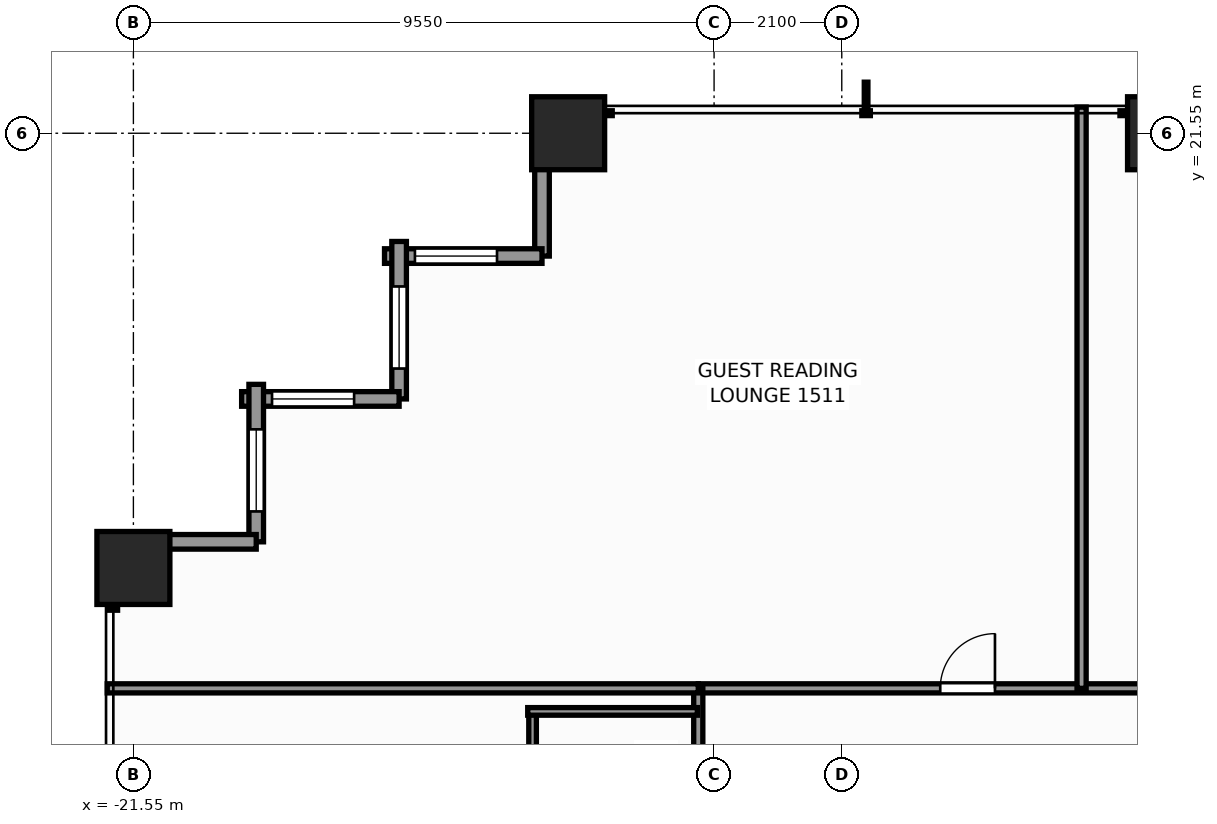
"""IFC4 building model, lengths in metres.
Left out: names, types, materials, properties, quantities, classifications, styles, units other than length and angle.
Written with IfcOpenShell. Run it as: python <this file> out.ifc"""

import sys

from ifc_helpers import new_model, si_unit, direction, frame, frame_2d, origin, origin_2d, place, context, subcontext, project, spatial, rectangle, extrude, element, fill, save


model = new_model("IFC4")
c1 = context("Model", 3, precision=1e-05, world=origin(), true_north=direction((0.0, 1.0)))
c2 = subcontext(c1, "Body", "Model", "MODEL_VIEW")
j1 = project(units=[si_unit("LENGTHUNIT", "METRE"), si_unit("PLANEANGLEUNIT", "RADIAN")], contexts=[c1])
p1 = place(None, origin())
s1 = spatial("IfcSite", under=j1, at=p1, CompositionType="ELEMENT")
p2 = place(p1, origin())
s2 = spatial("IfcBuilding", under=s1, at=p2, CompositionType="ELEMENT")
p3 = place(p2, frame((0.0, 0.0, 53.5)))
s3 = spatial("IfcBuildingStorey", under=s2, at=p3, CompositionType="ELEMENT", Elevation=53.5)
for number, where, z_axis, x_axis in (
    (1, (-14.4, 21.55, 0.0), (0.0, 0.0, 1.0), (1.0, 0.0, 0.0)),
    (2, (-4.6, 21.55, 0.0), (0.0, 0.0, 1.0), (1.0, 0.0, 0.0)),
    (3, (-21.55, 14.4, 0.0), (0.0, 0.0, 1.0), (1.0, 0.0, 0.0)),
):
    element("IfcColumn", number, at=place(p3, frame(where, z_axis=z_axis, x_axis=x_axis)), inside=s3, PredefinedType="COLUMN", context=c2, shape_type="SweptSolid", body=[
        extrude(rectangle(XDim=1.2, YDim=1.2, at=origin_2d()), origin(), (0.0, 0.0, 1.0), 3.3),
    ])
p4 = place(p3, frame((-14.83, 19.53, 0.0), z_axis=(0.0, 0.0, 1.0), x_axis=(0.0, 1.0, 0.0)))
e4 = element("IfcWall", 4, at=p4, inside=s3, PredefinedType="STANDARD", context=c2, shape_type="SweptSolid", body=[
    extrude(rectangle(XDim=2.59, YDim=0.24, at=frame_2d((1.295, 0.0))), origin(), (0.0, 0.0, 1.0), 2.439),
])
p5 = place(p3, frame((-17.42, 19.53, 0.0), z_axis=(0.0, 0.0, 1.0), x_axis=(1.0, 0.0, 0.0)))
e5 = element("IfcWall", 5, at=p5, inside=s3, PredefinedType="STANDARD", context=c2, shape_type="SweptSolid", body=[
    extrude(rectangle(XDim=2.59, YDim=0.24, at=frame_2d((1.295, 0.0))), origin(), (0.0, 0.0, 1.0), 2.439),
])
p6 = place(p5, frame((0.5, 0.0, 0.65)))
e6 = element("IfcOpeningElement", 6, at=p6, cuts=e5, PredefinedType="OPENING", context=c2, shape_type="SweptSolid", body=[
    extrude(rectangle(XDim=1.35, YDim=1.55, at=frame_2d((0.675, 0.775))), frame((0.0, 0.13, 0.0), z_axis=(0.0, -1.0, 0.0), x_axis=(1.0, 0.0, 0.0)), (0.0, 0.0, 1.0), 0.26),
])
p7 = place(p3, frame((-17.18, 17.18, 0.0), z_axis=(0.0, 0.0, 1.0), x_axis=(0.0, 1.0, 0.0)))
e7 = element("IfcWall", 7, at=p7, inside=s3, PredefinedType="STANDARD", context=c2, shape_type="SweptSolid", body=[
    extrude(rectangle(XDim=2.59, YDim=0.24, at=frame_2d((1.295, 0.0))), origin(), (0.0, 0.0, 1.0), 2.439),
])
p8 = place(p7, frame((0.5, 0.0, 0.65)))
e8 = element("IfcOpeningElement", 8, at=p8, cuts=e7, PredefinedType="OPENING", context=c2, shape_type="SweptSolid", body=[
    extrude(rectangle(XDim=1.35, YDim=1.55, at=frame_2d((0.675, 0.775))), frame((0.0, 0.13, 0.0), z_axis=(0.0, -1.0, 0.0), x_axis=(1.0, 0.0, 0.0)), (0.0, 0.0, 1.0), 0.26),
])
p9 = place(p3, frame((-19.77, 17.18, 0.0), z_axis=(0.0, 0.0, 1.0), x_axis=(1.0, 0.0, 0.0)))
e9 = element("IfcWall", 9, at=p9, inside=s3, PredefinedType="STANDARD", context=c2, shape_type="SweptSolid", body=[
    extrude(rectangle(XDim=2.59, YDim=0.24, at=frame_2d((1.295, 0.0))), origin(), (0.0, 0.0, 1.0), 2.439),
])
p10 = place(p9, frame((0.5, 0.0, 0.65)))
e10 = element("IfcOpeningElement", 10, at=p10, cuts=e9, PredefinedType="OPENING", context=c2, shape_type="SweptSolid", body=[
    extrude(rectangle(XDim=1.35, YDim=1.55, at=frame_2d((0.675, 0.775))), frame((0.0, 0.13, 0.0), z_axis=(0.0, -1.0, 0.0), x_axis=(1.0, 0.0, 0.0)), (0.0, 0.0, 1.0), 0.26),
])
p11 = place(p3, frame((-19.53, 14.83, 0.0), z_axis=(0.0, 0.0, 1.0), x_axis=(0.0, 1.0, 0.0)))
e11 = element("IfcWall", 11, at=p11, inside=s3, PredefinedType="STANDARD", context=c2, shape_type="SweptSolid", body=[
    extrude(rectangle(XDim=2.59, YDim=0.24, at=frame_2d((1.295, 0.0))), origin(), (0.0, 0.0, 1.0), 2.439),
])
p12 = place(p11, frame((0.5, 0.0, 0.65)))
e12 = element("IfcOpeningElement", 12, at=p12, cuts=e11, PredefinedType="OPENING", context=c2, shape_type="SweptSolid", body=[
    extrude(rectangle(XDim=1.35, YDim=1.55, at=frame_2d((0.675, 0.775))), frame((0.0, 0.13, 0.0), z_axis=(0.0, -1.0, 0.0), x_axis=(1.0, 0.0, 0.0)), (0.0, 0.0, 1.0), 0.26),
])
p13 = place(p3, frame((-22.12, 14.83, 0.0), z_axis=(0.0, 0.0, 1.0), x_axis=(1.0, 0.0, 0.0)))
e13 = element("IfcWall", 13, at=p13, inside=s3, PredefinedType="STANDARD", context=c2, shape_type="SweptSolid", body=[
    extrude(rectangle(XDim=2.59, YDim=0.24, at=frame_2d((1.295, 0.0))), origin(), (0.0, 0.0, 1.0), 2.439),
])
p14 = place(p3, frame((-12.26, 12.42, 0.0), z_axis=(0.0, 0.0, 1.0), x_axis=(1.0, 0.0, 0.0)))
e14 = element("IfcWall", 14, at=p14, inside=s3, PredefinedType="PARTITIONING", context=c2, shape_type="SweptSolid", body=[
    extrude(rectangle(XDim=24.84, YDim=0.15, at=frame_2d((12.42, 0.0))), origin(), (0.0, 0.0, 1.0), 2.272),
])
p15 = place(p14, frame((3.979, 0.0, 0.0)))
e15 = element("IfcOpeningElement", 15, at=p15, cuts=e14, PredefinedType="OPENING", context=c2, shape_type="SweptSolid", body=[
    extrude(rectangle(XDim=0.9, YDim=2.06, at=frame_2d((0.45, 1.03))), frame((0.0, 0.085, 0.0), z_axis=(0.0, -1.0, 0.0), x_axis=(1.0, 0.0, 0.0)), (0.0, 0.0, 1.0), 0.17),
])
p16 = place(p14, frame((9.78, 0.0, 0.0)))
e16 = element("IfcOpeningElement", 16, at=p16, cuts=e14, PredefinedType="OPENING", context=c2, shape_type="SweptSolid", body=[
    extrude(rectangle(XDim=0.9, YDim=2.06, at=frame_2d((0.45, 1.03))), frame((0.0, 0.085, 0.0), z_axis=(0.0, -1.0, 0.0), x_axis=(1.0, 0.0, 0.0)), (0.0, 0.0, 1.0), 0.17),
])
p17 = place(p14, frame((19.345, 0.0, 0.0)))
e17 = element("IfcOpeningElement", 17, at=p17, cuts=e14, PredefinedType="OPENING", context=c2, shape_type="SweptSolid", body=[
    extrude(rectangle(XDim=0.9, YDim=2.06, at=frame_2d((0.45, 1.03))), frame((0.0, 0.085, 0.0), z_axis=(0.0, -1.0, 0.0), x_axis=(1.0, 0.0, 0.0)), (0.0, 0.0, 1.0), 0.17),
])
p18 = place(p3, frame((-12.26, -12.42, 0.0), z_axis=(0.0, 0.0, 1.0), x_axis=(0.0, 1.0, 0.0)))
e18 = element("IfcWall", 18, at=p18, inside=s3, PredefinedType="PARTITIONING", context=c2, shape_type="SweptSolid", body=[
    extrude(rectangle(XDim=24.84, YDim=0.15, at=frame_2d((12.42, 0.0))), origin(), (0.0, 0.0, 1.0), 2.272),
])
p19 = place(p18, frame((3.551, 0.0, 0.0)))
e19 = element("IfcOpeningElement", 19, at=p19, cuts=e18, PredefinedType="OPENING", context=c2, shape_type="SweptSolid", body=[
    extrude(rectangle(XDim=0.95, YDim=2.06, at=frame_2d((0.475, 1.03))), frame((0.0, 0.085, 0.0), z_axis=(0.0, -1.0, 0.0), x_axis=(1.0, 0.0, 0.0)), (0.0, 0.0, 1.0), 0.17),
])
p20 = place(p18, frame((9.94, 0.0, 0.0)))
e20 = element("IfcOpeningElement", 20, at=p20, cuts=e18, PredefinedType="OPENING", context=c2, shape_type="SweptSolid", body=[
    extrude(rectangle(XDim=0.9, YDim=2.06, at=frame_2d((0.45, 1.03))), frame((0.0, 0.085, 0.0), z_axis=(0.0, -1.0, 0.0), x_axis=(1.0, 0.0, 0.0)), (0.0, 0.0, 1.0), 0.17),
])
p21 = place(p18, frame((19.741, 0.0, 0.0)))
e21 = element("IfcOpeningElement", 21, at=p21, cuts=e18, PredefinedType="OPENING", context=c2, shape_type="SweptSolid", body=[
    extrude(rectangle(XDim=0.95, YDim=2.06, at=frame_2d((0.475, 1.03))), frame((0.0, 0.085, 0.0), z_axis=(0.0, -1.0, 0.0), x_axis=(1.0, 0.0, 0.0)), (0.0, 0.0, 1.0), 0.17),
])
p22 = place(p3, frame((-21.98, 12.42, 0.0), z_axis=(0.0, 0.0, 1.0), x_axis=(1.0, 0.0, 0.0)))
e22 = element("IfcWall", 22, at=p22, inside=s3, PredefinedType="PARTITIONING", context=c2, shape_type="SweptSolid", body=[
    extrude(rectangle(XDim=9.72, YDim=0.15, at=frame_2d((4.86, 0.0))), origin(), (0.0, 0.0, 1.0), 2.272),
])
p23 = place(p3, frame((-14.985, 9.731, 0.0), z_axis=(0.0, 0.0, 1.0), x_axis=(0.0, 1.0, 0.0)))
e23 = element("IfcWall", 23, at=p23, inside=s3, PredefinedType="PARTITIONING", context=c2, shape_type="SweptSolid", body=[
    extrude(rectangle(XDim=2.37, YDim=0.125, at=frame_2d((1.185, 0.0))), origin(), (0.0, 0.0, 1.0), 2.272),
])
p24 = place(p3, frame((-15.065, 12.041, 0.0), z_axis=(0.0, 0.0, 1.0), x_axis=(1.0, 0.0, 0.0)))
e24 = element("IfcWall", 24, at=p24, inside=s3, PredefinedType="PARTITIONING", context=c2, shape_type="SweptSolid", body=[
    extrude(rectangle(XDim=2.79, YDim=0.125, at=frame_2d((1.395, 0.0))), origin(), (0.0, 0.0, 1.0), 2.272),
])
p25 = place(p3, frame((-5.956, 12.42, 0.0), z_axis=(0.0, 0.0, 1.0), x_axis=(0.0, 1.0, 0.0)))
e25 = element("IfcWall", 25, at=p25, inside=s3, PredefinedType="PARTITIONING", context=c2, shape_type="SweptSolid", body=[
    extrude(rectangle(XDim=9.56, YDim=0.15, at=frame_2d((4.78, 0.0))), origin(), (0.0, 0.0, 1.0), 2.429),
])
p26 = place(p6, origin())
e26 = element("IfcWindow", 26, at=p26, inside=s3, PartitioningType="SINGLE_PANEL", PredefinedType="WINDOW", context=c2, shape_type="SweptSolid", body=[
    extrude(rectangle(XDim=1.35, YDim=1.55, at=frame_2d((0.675, 0.775))), frame((0.0, 0.03, 0.0), z_axis=(0.0, -1.0, 0.0), x_axis=(1.0, 0.0, 0.0)), (0.0, 0.0, 1.0), 0.06),
])
fill(e6, e26)
p27 = place(p8, origin())
e27 = element("IfcWindow", 27, at=p27, inside=s3, PartitioningType="SINGLE_PANEL", PredefinedType="WINDOW", context=c2, shape_type="SweptSolid", body=[
    extrude(rectangle(XDim=1.35, YDim=1.55, at=frame_2d((0.675, 0.775))), frame((0.0, 0.03, 0.0), z_axis=(0.0, -1.0, 0.0), x_axis=(1.0, 0.0, 0.0)), (0.0, 0.0, 1.0), 0.06),
])
fill(e8, e27)
p28 = place(p10, origin())
e28 = element("IfcWindow", 28, at=p28, inside=s3, PartitioningType="SINGLE_PANEL", PredefinedType="WINDOW", context=c2, shape_type="SweptSolid", body=[
    extrude(rectangle(XDim=1.35, YDim=1.55, at=frame_2d((0.675, 0.775))), frame((0.0, 0.03, 0.0), z_axis=(0.0, -1.0, 0.0), x_axis=(1.0, 0.0, 0.0)), (0.0, 0.0, 1.0), 0.06),
])
fill(e10, e28)
p29 = place(p12, origin())
e29 = element("IfcWindow", 29, at=p29, inside=s3, PartitioningType="SINGLE_PANEL", PredefinedType="WINDOW", context=c2, shape_type="SweptSolid", body=[
    extrude(rectangle(XDim=1.35, YDim=1.55, at=frame_2d((0.675, 0.775))), frame((0.0, 0.03, 0.0), z_axis=(0.0, -1.0, 0.0), x_axis=(1.0, 0.0, 0.0)), (0.0, 0.0, 1.0), 0.06),
])
fill(e12, e29)
p30 = place(p15, origin())
e30 = element("IfcDoor", 30, at=p30, inside=s3, OperationType="SINGLE_SWING_RIGHT", PredefinedType="DOOR", context=c2, shape_type="SweptSolid", body=[
    extrude(rectangle(XDim=0.9, YDim=2.06, at=frame_2d((0.45, 1.03))), frame((0.0, 0.025, 0.0), z_axis=(0.0, -1.0, 0.0), x_axis=(1.0, 0.0, 0.0)), (0.0, 0.0, 1.0), 0.05),
])
fill(e15, e30)
save(model, sys.argv[1])
